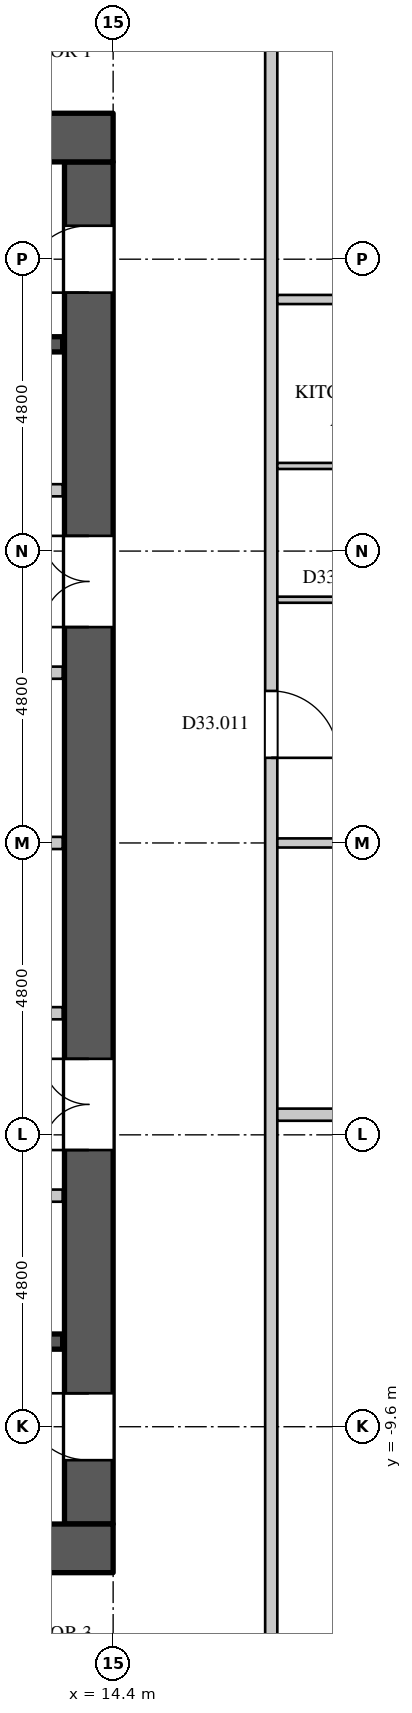
"""IFC4 building model, lengths in metres.
Left out: names, types, materials, properties, quantities, classifications, styles, units other than length and angle.
Written with IfcOpenShell. Run it as: python <this file> out.ifc"""

import sys

from ifc_helpers import new_model, si_unit, direction, frame, frame_2d, origin, place, context, subcontext, project, spatial, rectangle, extrude, element, fill, save


model = new_model("IFC4")
c1 = context("Model", 3, precision=1e-05, world=origin(), true_north=direction((0.0, 1.0)))
c2 = subcontext(c1, "Body", "Model", "MODEL_VIEW")
j1 = project(units=[si_unit("LENGTHUNIT", "METRE"), si_unit("PLANEANGLEUNIT", "RADIAN")], contexts=[c1])
p1 = place(None, origin())
s1 = spatial("IfcSite", under=j1, at=p1, CompositionType="ELEMENT")
p2 = place(p1, origin())
s2 = spatial("IfcBuilding", under=s1, at=p2, CompositionType="ELEMENT")
p3 = place(p2, frame((0.0, 0.0, 144.3)))
s3 = spatial("IfcBuildingStorey", under=s2, at=p3, CompositionType="ELEMENT", Elevation=144.3)
for number, where, z_axis, x_axis in (
    (1, (-14.4, 11.6, 0.0), (0.0, 0.0, 1.0), (1.0, 0.0, 0.0)),
    (2, (-14.4, -11.6, 0.0), (0.0, 0.0, 1.0), (1.0, 0.0, 0.0)),
):
    element("IfcWall", number, at=place(p3, frame(where, z_axis=z_axis, x_axis=x_axis)), inside=s3, PredefinedType="SHEAR", context=c2, shape_type="SweptSolid", body=[
        extrude(rectangle(XDim=28.8, YDim=0.8, at=frame_2d((14.4, 0.0))), origin(), (0.0, 0.0, 1.0), 4.2),
    ])
p4 = place(p3, frame((14.0, -11.2, 0.0), z_axis=(0.0, 0.0, 1.0), x_axis=(0.0, 1.0, 0.0)))
e3 = element("IfcWall", 3, at=p4, inside=s3, PredefinedType="SHEAR", context=c2, shape_type="SweptSolid", body=[
    extrude(rectangle(XDim=22.4, YDim=0.8, at=frame_2d((11.2, 0.0))), origin(), (0.0, 0.0, 1.0), 4.2),
])
p5 = place(p4, frame((20.25, 0.0, 0.0)))
e4 = element("IfcOpeningElement", 4, at=p5, cuts=e3, PredefinedType="OPENING", context=c2, shape_type="SweptSolid", body=[
    extrude(rectangle(XDim=1.1, YDim=2.2, at=frame_2d((0.55, 1.1))), frame((0.0, 0.41, 0.0), z_axis=(0.0, -1.0, 0.0), x_axis=(1.0, 0.0, 0.0)), (0.0, 0.0, 1.0), 0.82),
])
p6 = place(p4, frame((1.05, 0.0, 0.0)))
e5 = element("IfcOpeningElement", 5, at=p6, cuts=e3, PredefinedType="OPENING", context=c2, shape_type="SweptSolid", body=[
    extrude(rectangle(XDim=1.1, YDim=2.2, at=frame_2d((0.55, 1.1))), frame((0.0, 0.41, 0.0), z_axis=(0.0, -1.0, 0.0), x_axis=(1.0, 0.0, 0.0)), (0.0, 0.0, 1.0), 0.82),
])
p7 = place(p4, frame((14.75, 0.0, 0.0)))
e6 = element("IfcOpeningElement", 6, at=p7, cuts=e3, PredefinedType="OPENING", context=c2, shape_type="SweptSolid", body=[
    extrude(rectangle(XDim=1.5, YDim=2.4, at=frame_2d((0.75, 1.2))), frame((0.0, 0.41, 0.0), z_axis=(0.0, -1.0, 0.0), x_axis=(1.0, 0.0, 0.0)), (0.0, 0.0, 1.0), 0.82),
])
p8 = place(p4, frame((6.15, 0.0, 0.0)))
e7 = element("IfcOpeningElement", 7, at=p8, cuts=e3, PredefinedType="OPENING", context=c2, shape_type="SweptSolid", body=[
    extrude(rectangle(XDim=1.5, YDim=2.4, at=frame_2d((0.75, 1.2))), frame((0.0, 0.41, 0.0), z_axis=(0.0, -1.0, 0.0), x_axis=(1.0, 0.0, 0.0)), (0.0, 0.0, 1.0), 0.82),
])
p9 = place(p3, frame((0.78, 5.8, 0.0), z_axis=(0.0, 0.0, 1.0), x_axis=(1.0, 0.0, 0.0)))
e8 = element("IfcWall", 8, at=p9, inside=s3, PredefinedType="PARTITIONING", context=c2, shape_type="SweptSolid", body=[
    extrude(rectangle(XDim=12.79, YDim=0.2, at=frame_2d((6.395, 0.0))), origin(), (0.0, 0.0, 1.0), 3.798),
])
p10 = place(p9, frame((3.15, 0.0, 0.0)))
e9 = element("IfcOpeningElement", 9, at=p10, cuts=e8, PredefinedType="OPENING", context=c2, shape_type="SweptSolid", body=[
    extrude(rectangle(XDim=0.9, YDim=2.2, at=frame_2d((0.45, 1.1))), frame((0.0, 0.11, 0.0), z_axis=(0.0, -1.0, 0.0), x_axis=(1.0, 0.0, 0.0)), (0.0, 0.0, 1.0), 0.22),
])
p11 = place(p9, frame((9.35, 0.0, 0.0)))
e10 = element("IfcOpeningElement", 10, at=p11, cuts=e8, PredefinedType="OPENING", context=c2, shape_type="SweptSolid", body=[
    extrude(rectangle(XDim=0.9, YDim=2.2, at=frame_2d((0.45, 1.1))), frame((0.0, 0.11, 0.0), z_axis=(0.0, -1.0, 0.0), x_axis=(1.0, 0.0, 0.0)), (0.0, 0.0, 1.0), 0.22),
])
p12 = place(p3, frame((4.02, -5.8, 0.0), z_axis=(0.0, 0.0, 1.0), x_axis=(1.0, 0.0, 0.0)))
e11 = element("IfcWall", 11, at=p12, inside=s3, PredefinedType="PARTITIONING", context=c2, shape_type="SweptSolid", body=[
    extrude(rectangle(XDim=9.55, YDim=0.2, at=frame_2d((4.775, 0.0))), origin(), (0.0, 0.0, 1.0), 3.798),
])
p13 = place(p12, frame((4.3, 0.0, 0.0)))
e12 = element("IfcOpeningElement", 12, at=p13, cuts=e11, PredefinedType="OPENING", context=c2, shape_type="SweptSolid", body=[
    extrude(rectangle(XDim=0.9, YDim=2.2, at=frame_2d((0.45, 1.1))), frame((0.0, 0.11, 0.0), z_axis=(0.0, -1.0, 0.0), x_axis=(1.0, 0.0, 0.0)), (0.0, 0.0, 1.0), 0.22),
])
p14 = place(p3, frame((17.0, -14.5, 0.0), z_axis=(0.0, 0.0, 1.0), x_axis=(0.0, 1.0, 0.0)))
e13 = element("IfcWall", 13, at=p14, inside=s3, PredefinedType="PARTITIONING", context=c2, shape_type="SweptSolid", body=[
    extrude(rectangle(XDim=29.0, YDim=0.2, at=frame_2d((14.5, 0.0))), origin(), (0.0, 0.0, 1.0), 3.798),
])
p15 = place(p14, frame((15.9, 0.0, 0.0)))
e14 = element("IfcOpeningElement", 14, at=p15, cuts=e13, PredefinedType="OPENING", context=c2, shape_type="SweptSolid", body=[
    extrude(rectangle(XDim=1.1, YDim=2.4, at=frame_2d((0.55, 1.2))), frame((0.0, 0.11, 0.0), z_axis=(0.0, -1.0, 0.0), x_axis=(1.0, 0.0, 0.0)), (0.0, 0.0, 1.0), 0.22),
])
p16 = place(p3, frame((15.099, -17.636, 0.0), z_axis=(0.0, 0.0, 1.0), x_axis=(0.707106781187, 0.707106781187, 0.0)))
e15 = element("IfcWall", 15, at=p16, inside=s3, PredefinedType="PARTITIONING", context=c2, shape_type="SweptSolid", body=[
    extrude(rectangle(XDim=8.986, YDim=0.15, at=frame_2d((4.493, 0.0))), origin(), (0.0, 0.0, 1.0), 3.798),
])
p17 = place(p16, frame((0.4, 0.0, 0.0)))
e16 = element("IfcOpeningElement", 16, at=p17, cuts=e15, PredefinedType="OPENING", context=c2, shape_type="SweptSolid", body=[
    extrude(rectangle(XDim=0.95, YDim=2.2, at=frame_2d((0.475, 1.1))), frame((0.0, 0.085, 0.0), z_axis=(0.0, -1.0, 0.0), x_axis=(1.0, 0.0, 0.0)), (0.0, 0.0, 1.0), 0.17),
])
p18 = place(p16, frame((5.1, 0.0, 0.0)))
e17 = element("IfcOpeningElement", 17, at=p18, cuts=e15, PredefinedType="OPENING", context=c2, shape_type="SweptSolid", body=[
    extrude(rectangle(XDim=0.95, YDim=2.2, at=frame_2d((0.475, 1.1))), frame((0.0, 0.085, 0.0), z_axis=(0.0, -1.0, 0.0), x_axis=(1.0, 0.0, 0.0)), (0.0, 0.0, 1.0), 0.17),
])
p19 = place(p16, frame((7.85, 0.0, 0.0)))
e18 = element("IfcOpeningElement", 18, at=p19, cuts=e15, PredefinedType="OPENING", context=c2, shape_type="SweptSolid", body=[
    extrude(rectangle(XDim=0.95, YDim=2.2, at=frame_2d((0.475, 1.1))), frame((0.0, 0.085, 0.0), z_axis=(0.0, -1.0, 0.0), x_axis=(1.0, 0.0, 0.0)), (0.0, 0.0, 1.0), 0.17),
])
p20 = place(p3, frame((16.367, 16.367, 0.0), z_axis=(0.0, 0.0, 1.0), x_axis=(0.707106781187, -0.707106781187, 0.0)))
e19 = element("IfcWall", 19, at=p20, inside=s3, PredefinedType="PARTITIONING", context=c2, shape_type="SweptSolid", body=[
    extrude(rectangle(XDim=7.192, YDim=0.15, at=frame_2d((3.596, 0.0))), origin(), (0.0, 0.0, 1.0), 3.798),
])
p21 = place(p20, frame((6.05, 0.0, 0.0)))
e20 = element("IfcOpeningElement", 20, at=p21, cuts=e19, PredefinedType="OPENING", context=c2, shape_type="SweptSolid", body=[
    extrude(rectangle(XDim=0.95, YDim=2.2, at=frame_2d((0.475, 1.1))), frame((0.0, 0.085, 0.0), z_axis=(0.0, -1.0, 0.0), x_axis=(1.0, 0.0, 0.0)), (0.0, 0.0, 1.0), 0.17),
])
p22 = place(p20, frame((3.35, 0.0, 0.0)))
e21 = element("IfcOpeningElement", 21, at=p22, cuts=e19, PredefinedType="OPENING", context=c2, shape_type="SweptSolid", body=[
    extrude(rectangle(XDim=0.95, YDim=2.2, at=frame_2d((0.475, 1.1))), frame((0.0, 0.085, 0.0), z_axis=(0.0, -1.0, 0.0), x_axis=(1.0, 0.0, 0.0)), (0.0, 0.0, 1.0), 0.17),
])
p23 = place(p3, frame((17.1, 0.0, 0.0), z_axis=(0.0, 0.0, 1.0), x_axis=(1.0, 0.0, 0.0)))
e22 = element("IfcWall", 22, at=p23, inside=s3, PredefinedType="PARTITIONING", context=c2, shape_type="SweptSolid", body=[
    extrude(rectangle(XDim=9.355, YDim=0.15, at=frame_2d((4.677, 0.0))), origin(), (0.0, 0.0, 1.0), 3.798),
])
p24 = place(p23, frame((1.85, 0.0, 0.0)))
e23 = element("IfcOpeningElement", 23, at=p24, cuts=e22, PredefinedType="OPENING", context=c2, shape_type="SweptSolid", body=[
    extrude(rectangle(XDim=0.95, YDim=2.2, at=frame_2d((0.475, 1.1))), frame((0.0, 0.085, 0.0), z_axis=(0.0, -1.0, 0.0), x_axis=(1.0, 0.0, 0.0)), (0.0, 0.0, 1.0), 0.17),
])
p25 = place(p3, frame((17.1, 8.937, 0.0), z_axis=(0.0, 0.0, 1.0), x_axis=(1.0, 0.0, 0.0)))
e24 = element("IfcWall", 24, at=p25, inside=s3, PredefinedType="PARTITIONING", context=c2, shape_type="SweptSolid", body=[
    extrude(rectangle(XDim=9.355, YDim=0.15, at=frame_2d((4.677, 0.0))), origin(), (0.0, 0.0, 1.0), 3.798),
])
p26 = place(p25, frame((6.05, 0.0, 0.0)))
e25 = element("IfcOpeningElement", 25, at=p26, cuts=e24, PredefinedType="OPENING", context=c2, shape_type="SweptSolid", body=[
    extrude(rectangle(XDim=1.5, YDim=2.2, at=frame_2d((0.75, 1.1))), frame((0.0, 0.085, 0.0), z_axis=(0.0, -1.0, 0.0), x_axis=(1.0, 0.0, 0.0)), (0.0, 0.0, 1.0), 0.17),
])
p27 = place(p25, frame((1.85, 0.0, 0.0)))
e26 = element("IfcOpeningElement", 26, at=p27, cuts=e24, PredefinedType="OPENING", context=c2, shape_type="SweptSolid", body=[
    extrude(rectangle(XDim=0.95, YDim=2.2, at=frame_2d((0.475, 1.1))), frame((0.0, 0.085, 0.0), z_axis=(0.0, -1.0, 0.0), x_axis=(1.0, 0.0, 0.0)), (0.0, 0.0, 1.0), 0.17),
])
p28 = place(p3, frame((17.1, -4.469, 0.0), z_axis=(0.0, 0.0, 1.0), x_axis=(1.0, 0.0, 0.0)))
e27 = element("IfcWall", 27, at=p28, inside=s3, PredefinedType="PARTITIONING", context=c2, shape_type="SweptSolid", body=[
    extrude(rectangle(XDim=8.55, YDim=0.2, at=frame_2d((4.275, 0.0))), origin(), (0.0, 0.0, 1.0), 3.15),
])
p29 = place(p3, frame((10.38, -2.8, 0.0), z_axis=(0.0, 0.0, 1.0), x_axis=(1.0, 0.0, 0.0)))
e28 = element("IfcWall", 28, at=p29, inside=s3, PredefinedType="PARTITIONING", context=c2, shape_type="SweptSolid", body=[
    extrude(rectangle(XDim=3.19, YDim=0.2, at=frame_2d((1.595, 0.0))), origin(), (0.0, 0.0, 1.0), 3.798),
])
p30 = place(p29, frame((1.1, 0.0, 0.0)))
e29 = element("IfcOpeningElement", 29, at=p30, cuts=e28, PredefinedType="OPENING", context=c2, shape_type="SweptSolid", body=[
    extrude(rectangle(XDim=0.9, YDim=2.2, at=frame_2d((0.45, 1.1))), frame((0.0, 0.11, 0.0), z_axis=(0.0, -1.0, 0.0), x_axis=(1.0, 0.0, 0.0)), (0.0, 0.0, 1.0), 0.22),
])
p31 = place(p3, frame((10.4, 2.8, 0.0), z_axis=(0.0, 0.0, 1.0), x_axis=(1.0, 0.0, 0.0)))
e30 = element("IfcWall", 30, at=p31, inside=s3, PredefinedType="PARTITIONING", context=c2, shape_type="SweptSolid", body=[
    extrude(rectangle(XDim=3.17, YDim=0.2, at=frame_2d((1.585, 0.0))), origin(), (0.0, 0.0, 1.0), 3.798),
])
p32 = place(p31, frame((1.25, 0.0, 0.0)))
e31 = element("IfcOpeningElement", 31, at=p32, cuts=e30, PredefinedType="OPENING", context=c2, shape_type="SweptSolid", body=[
    extrude(rectangle(XDim=0.6, YDim=2.0, at=frame_2d((0.3, 1.0))), frame((0.0, 0.11, 0.0), z_axis=(0.0, -1.0, 0.0), x_axis=(1.0, 0.0, 0.0)), (0.0, 0.0, 1.0), 0.22),
])
p33 = place(p3, frame((10.4, 0.0, 0.0), z_axis=(0.0, 0.0, 1.0), x_axis=(1.0, 0.0, 0.0)))
e32 = element("IfcWall", 32, at=p33, inside=s3, PredefinedType="PARTITIONING", context=c2, shape_type="SweptSolid", body=[
    extrude(rectangle(XDim=3.17, YDim=0.2, at=frame_2d((1.585, 0.0))), origin(), (0.0, 0.0, 1.0), 3.798),
])
for number, where, z_axis, x_axis in (
    (33, (5.275, -8.2, 0.0), (0.0, 0.0, 1.0), (1.0, 0.0, 0.0)),
    (34, (5.275, 8.2, 0.0), (0.0, 0.0, 1.0), (1.0, 0.0, 0.0)),
):
    element("IfcWall", number, at=place(p3, frame(where, z_axis=z_axis, x_axis=x_axis)), inside=s3, PredefinedType="SHEAR", context=c2, shape_type="SweptSolid", body=[
        extrude(rectangle(XDim=8.295, YDim=0.25, at=frame_2d((4.147, 0.0))), origin(), (0.0, 0.0, 1.0), 3.798),
    ])
p34 = place(p3, frame((17.1, 4.0, 0.0), z_axis=(0.0, 0.0, 1.0), x_axis=(1.0, 0.0, 0.0)))
e35 = element("IfcWall", 35, at=p34, inside=s3, PredefinedType="PARTITIONING", context=c2, shape_type="SweptSolid", body=[
    extrude(rectangle(XDim=3.65, YDim=0.1, at=frame_2d((1.825, 0.0))), origin(), (0.0, 0.0, 1.0), 3.798),
])
p35 = place(p34, frame((1.85, 0.0, 0.0)))
e36 = element("IfcOpeningElement", 36, at=p35, cuts=e35, PredefinedType="OPENING", context=c2, shape_type="SweptSolid", body=[
    extrude(rectangle(XDim=0.9, YDim=2.2, at=frame_2d((0.45, 1.1))), frame((0.0, 0.06, 0.0), z_axis=(0.0, -1.0, 0.0), x_axis=(1.0, 0.0, 0.0)), (0.0, 0.0, 1.0), 0.12),
])
p36 = place(p3, frame((17.1, 6.2, 0.0), z_axis=(0.0, 0.0, 1.0), x_axis=(1.0, 0.0, 0.0)))
e37 = element("IfcWall", 37, at=p36, inside=s3, PredefinedType="PARTITIONING", context=c2, shape_type="SweptSolid", body=[
    extrude(rectangle(XDim=3.625, YDim=0.1, at=frame_2d((1.812, 0.0))), origin(), (0.0, 0.0, 1.0), 3.798),
])
p37 = place(p5, origin())
e38 = element("IfcDoor", 38, at=p37, inside=s3, OperationType="SINGLE_SWING_LEFT", PredefinedType="DOOR", context=c2, shape_type="SweptSolid", body=[
    extrude(rectangle(XDim=1.1, YDim=2.2, at=frame_2d((0.55, 1.1))), frame((0.0, 0.395, 0.0), z_axis=(0.0, -1.0, 0.0), x_axis=(1.0, 0.0, 0.0)), (0.0, 0.0, 1.0), 0.05),
])
fill(e4, e38)
p38 = place(p6, origin())
e39 = element("IfcDoor", 39, at=p38, inside=s3, OperationType="SINGLE_SWING_RIGHT", PredefinedType="DOOR", context=c2, shape_type="SweptSolid", body=[
    extrude(rectangle(XDim=1.1, YDim=2.2, at=frame_2d((0.55, 1.1))), frame((0.0, 0.395, 0.0), z_axis=(0.0, -1.0, 0.0), x_axis=(1.0, 0.0, 0.0)), (0.0, 0.0, 1.0), 0.05),
])
fill(e5, e39)
p39 = place(p7, origin())
e40 = element("IfcDoor", 40, at=p39, inside=s3, OperationType="DOUBLE_DOOR_SINGLE_SWING", PredefinedType="DOOR", context=c2, shape_type="SweptSolid", body=[
    extrude(rectangle(XDim=1.5, YDim=2.4, at=frame_2d((0.75, 1.2))), frame((0.0, 0.395, 0.0), z_axis=(0.0, -1.0, 0.0), x_axis=(1.0, 0.0, 0.0)), (0.0, 0.0, 1.0), 0.05),
])
fill(e6, e40)
p40 = place(p8, origin())
e41 = element("IfcDoor", 41, at=p40, inside=s3, OperationType="DOUBLE_DOOR_SINGLE_SWING", PredefinedType="DOOR", context=c2, shape_type="SweptSolid", body=[
    extrude(rectangle(XDim=1.5, YDim=2.4, at=frame_2d((0.75, 1.2))), frame((0.0, 0.395, 0.0), z_axis=(0.0, -1.0, 0.0), x_axis=(1.0, 0.0, 0.0)), (0.0, 0.0, 1.0), 0.05),
])
fill(e7, e41)
p41 = place(p15, origin())
e42 = element("IfcDoor", 42, at=p41, inside=s3, OperationType="SINGLE_SWING_RIGHT", PredefinedType="DOOR", context=c2, shape_type="SweptSolid", body=[
    extrude(rectangle(XDim=1.1, YDim=2.4, at=frame_2d((0.55, 1.2))), frame((0.0, 0.025, 0.0), z_axis=(0.0, -1.0, 0.0), x_axis=(1.0, 0.0, 0.0)), (0.0, 0.0, 1.0), 0.05),
])
fill(e14, e42)
save(model, sys.argv[1])
